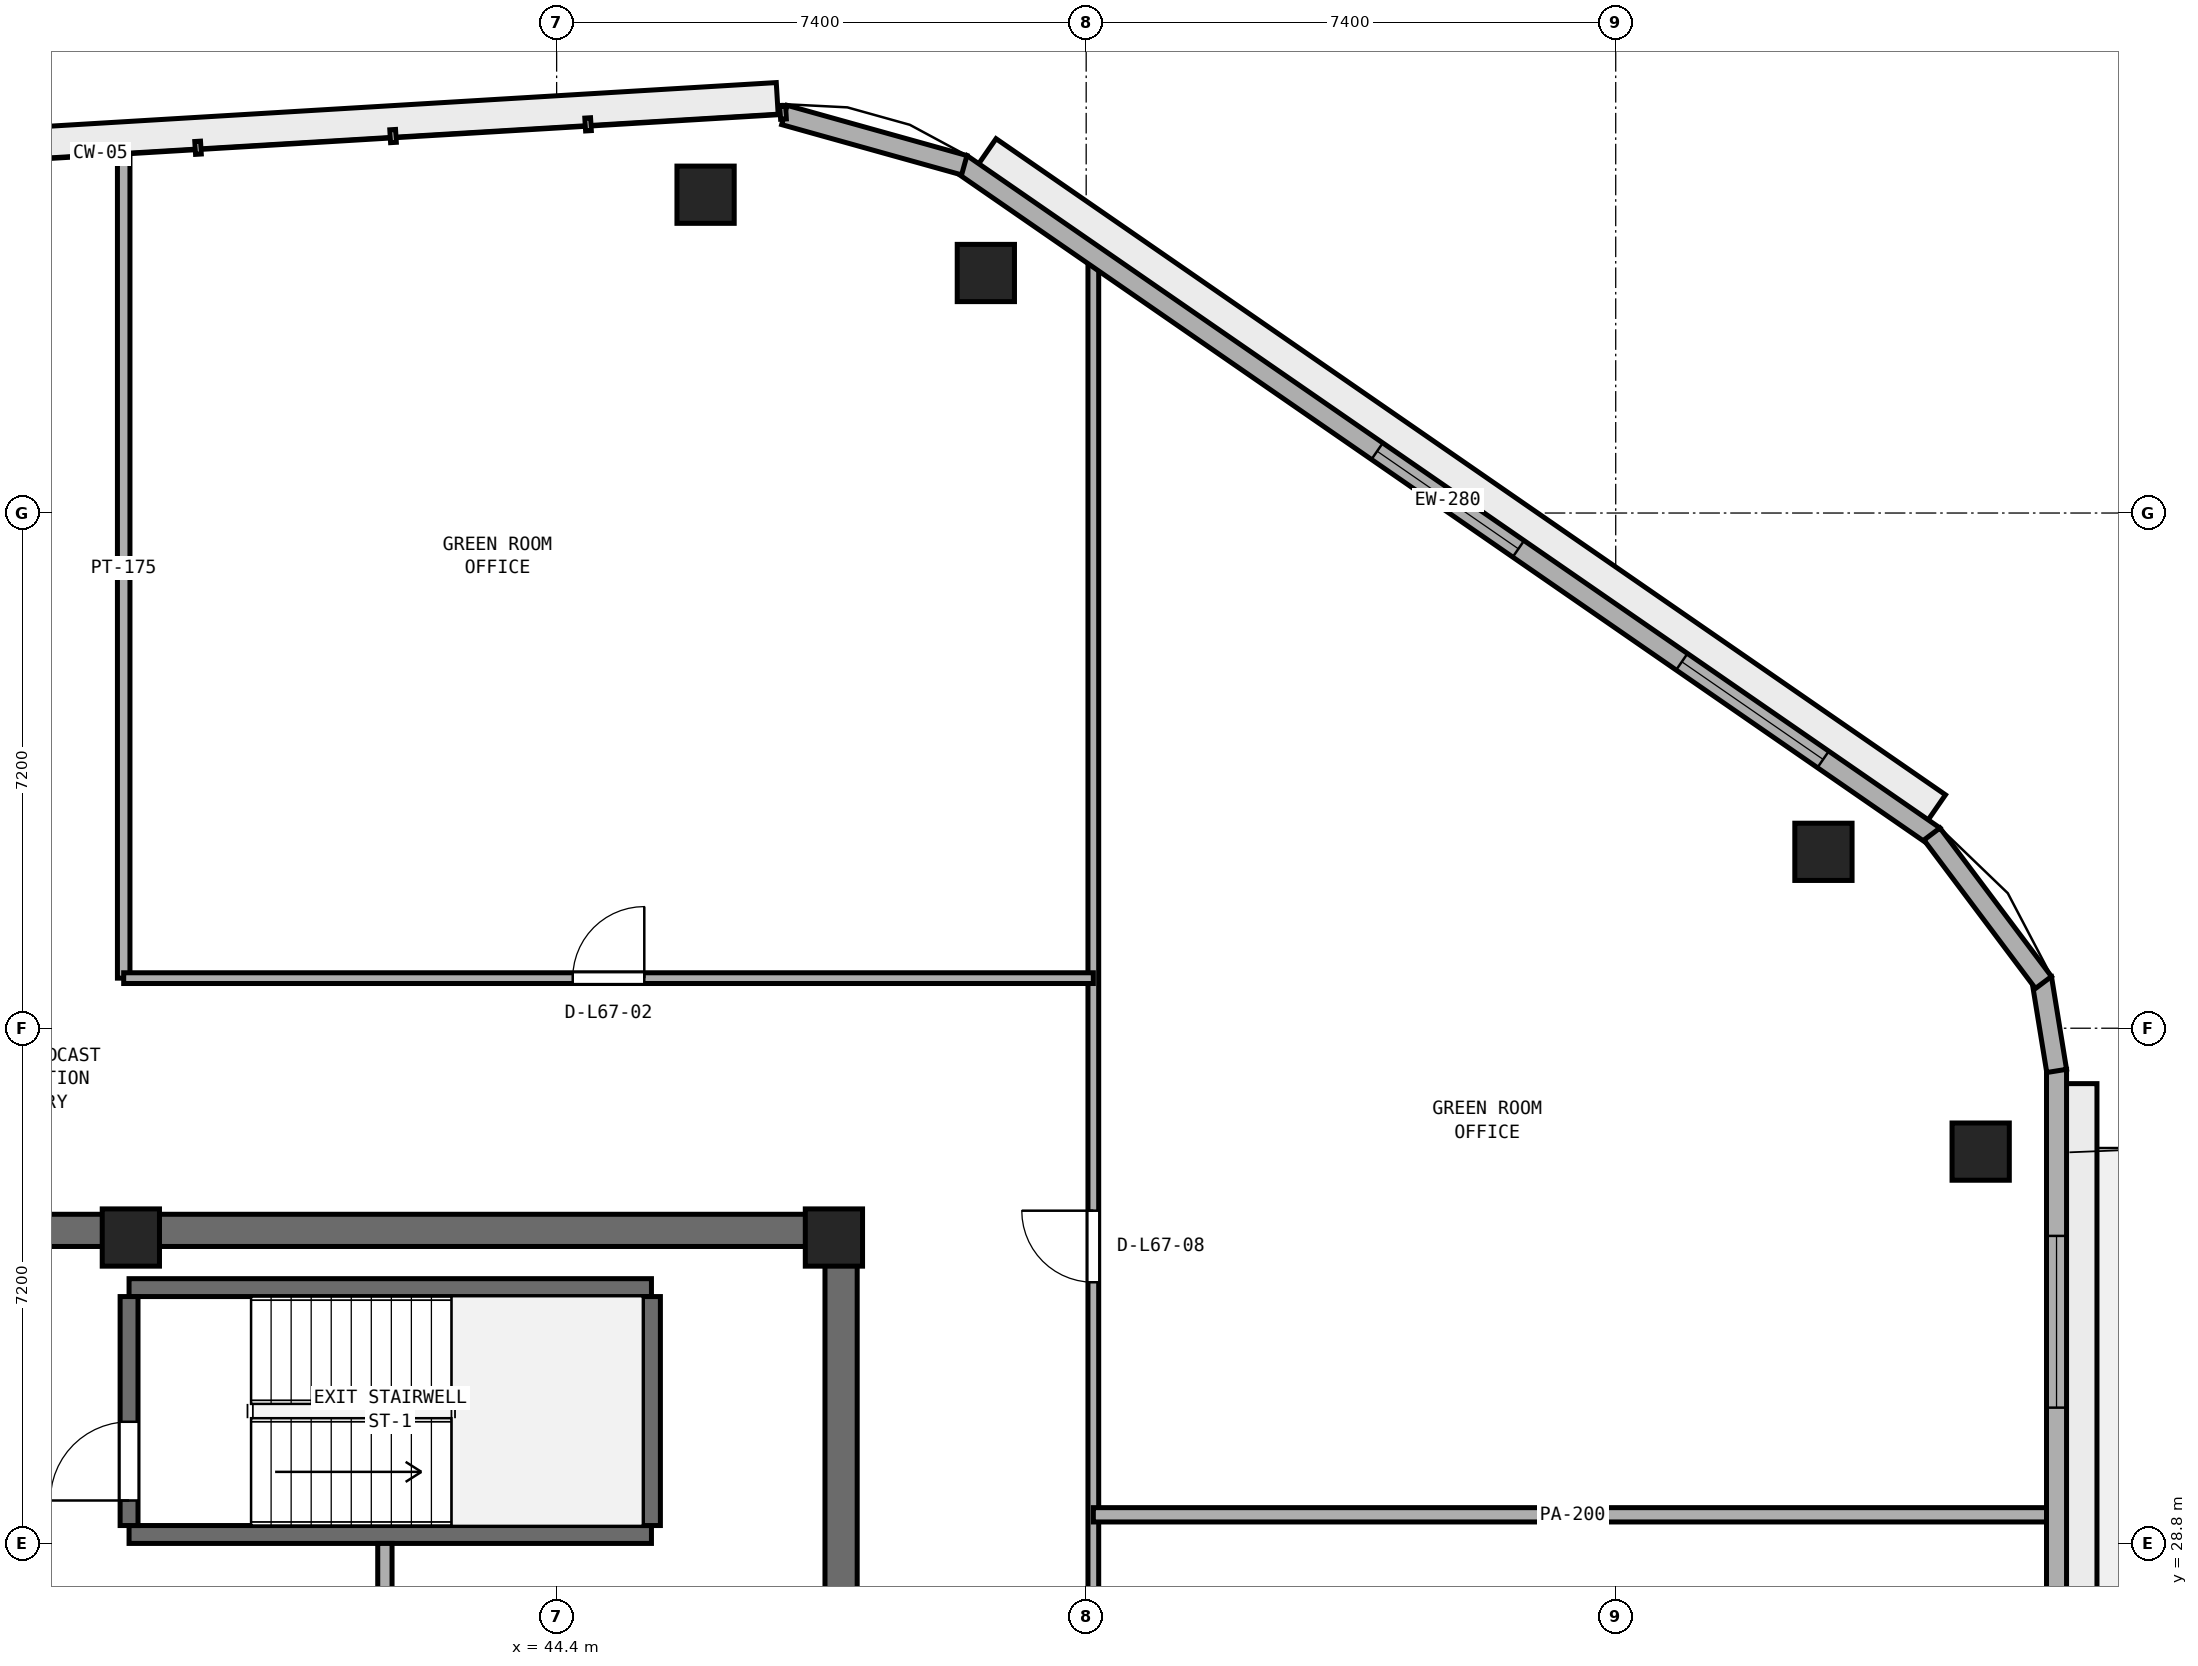
"""IFC4 building model, lengths in metres.
Left out: names, types, materials, properties, quantities, classifications, styles, units other than length and angle.
Written with IfcOpenShell. Run it as: python <this file> out.ifc"""

import sys

from ifc_helpers import new_model, si_unit, direction, frame, frame_2d, origin, origin_2d, place, context, subcontext, project, spatial, rectangle, extrude, element, fill, save


model = new_model("IFC4")
c1 = context("Model", 3, precision=1e-05, world=origin(), true_north=direction((0.0, 1.0)))
c2 = subcontext(c1, "Body", "Model", "MODEL_VIEW")
j1 = project(units=[si_unit("LENGTHUNIT", "METRE"), si_unit("PLANEANGLEUNIT", "RADIAN")], contexts=[c1])
p1 = place(None, origin())
s1 = spatial("IfcSite", under=j1, at=p1, CompositionType="ELEMENT")
p2 = place(p1, origin())
s2 = spatial("IfcBuilding", under=s1, at=p2, CompositionType="ELEMENT")
p3 = place(p2, frame((0.0, 0.0, 263.0)))
s3 = spatial("IfcBuildingStorey", under=s2, at=p3, CompositionType="ELEMENT", Elevation=263.0)
p4 = place(p3, frame((25.4, 33.175, 0.0), z_axis=(0.0, 0.0, 1.0), x_axis=(1.0, 0.0, 0.0)))
e1 = element("IfcWall", 1, at=p4, inside=s3, PredefinedType="SHEAR", context=c2, shape_type="SweptSolid", body=[
    extrude(rectangle(XDim=23.2, YDim=0.45, at=frame_2d((11.6, 0.0))), origin(), (0.0, 0.0, 1.0), 3.51),
])
p5 = place(p3, frame((48.375, 17.45, 0.0), z_axis=(0.0, 0.0, 1.0), x_axis=(0.0, 1.0, 0.0)))
e2 = element("IfcWall", 2, at=p5, inside=s3, PredefinedType="SHEAR", context=c2, shape_type="SweptSolid", body=[
    extrude(rectangle(XDim=15.5, YDim=0.45, at=frame_2d((7.75, 0.0))), origin(), (0.0, 0.0, 1.0), 3.51),
])
p6 = place(p5, frame((5.85, 0.0, 0.0)))
e3 = element("IfcOpeningElement", 3, at=p6, cuts=e2, PredefinedType="OPENING", context=c2, shape_type="SweptSolid", body=[
    extrude(rectangle(XDim=1.5, YDim=2.15, at=frame_2d((0.75, 1.075))), frame((0.0, 0.235, 0.0), z_axis=(0.0, -1.0, 0.0), x_axis=(1.0, 0.0, 0.0)), (0.0, 0.0, 1.0), 0.47),
])
for number, where, z_axis, x_axis in (
    (4, (48.275, 33.075, 0.0), (0.0, 0.0, 1.0), (1.0, 0.0, 0.0)),
    (5, (38.45, 33.075, 0.0), (0.0, 0.0, 1.0), (1.0, 0.0, 0.0)),
):
    element("IfcColumn", number, at=place(p3, frame(where, z_axis=z_axis, x_axis=x_axis)), inside=s3, PredefinedType="PILASTER", context=c2, shape_type="SweptSolid", body=[
        extrude(rectangle(XDim=0.8, YDim=0.8, at=origin_2d()), origin(), (0.0, 0.0, 1.0), 3.8),
    ])
for number, where, z_axis, x_axis in (
    (6, (64.3, 34.276, 0.0), (0.0, 0.0, 1.0), (1.0, 0.0, 0.0)),
    (7, (62.103, 38.465, 0.0), (0.0, 0.0, 1.0), (1.0, 0.0, 0.0)),
    (8, (50.398, 46.554, 0.0), (0.0, 0.0, 1.0), (1.0, 0.0, 0.0)),
    (9, (46.481, 47.648, 0.0), (0.0, 0.0, 1.0), (1.0, 0.0, 0.0)),
):
    element("IfcColumn", number, at=place(p3, frame(where, z_axis=z_axis, x_axis=x_axis)), inside=s3, PredefinedType="COLUMN", context=c2, shape_type="SweptSolid", body=[
        extrude(rectangle(XDim=0.8, YDim=0.8, at=origin_2d()), origin(), (0.0, 0.0, 1.0), 3.8),
    ])
for number, where, z_axis, x_axis in (
    (10, (38.425, 28.925, 0.0), (0.0, 0.0, 1.0), (1.0, 0.0, 0.0)),
    (11, (38.425, 32.375, 0.0), (0.0, 0.0, 1.0), (1.0, 0.0, 0.0)),
):
    element("IfcWall", number, at=place(p3, frame(where, z_axis=z_axis, x_axis=x_axis)), inside=s3, PredefinedType="SHEAR", context=c2, shape_type="SweptSolid", body=[
        extrude(rectangle(XDim=7.3, YDim=0.25, at=frame_2d((3.65, 0.0))), origin(), (0.0, 0.0, 1.0), 3.51),
    ])
p7 = place(p3, frame((38.425, 29.05, 0.0), z_axis=(0.0, 0.0, 1.0), x_axis=(0.0, 1.0, 0.0)))
e12 = element("IfcWall", 12, at=p7, inside=s3, PredefinedType="SHEAR", context=c2, shape_type="SweptSolid", body=[
    extrude(rectangle(XDim=3.2, YDim=0.25, at=frame_2d((1.6, 0.0))), origin(), (0.0, 0.0, 1.0), 3.51),
])
p8 = place(p7, frame((0.35, 0.0, 0.0)))
e13 = element("IfcOpeningElement", 13, at=p8, cuts=e12, PredefinedType="OPENING", context=c2, shape_type="SweptSolid", body=[
    extrude(rectangle(XDim=1.1, YDim=2.15, at=frame_2d((0.55, 1.075))), frame((0.0, 0.135, 0.0), z_axis=(0.0, -1.0, 0.0), x_axis=(1.0, 0.0, 0.0)), (0.0, 0.0, 1.0), 0.27),
])
p9 = place(p3, frame((45.725, 29.05, 0.0), z_axis=(0.0, 0.0, 1.0), x_axis=(0.0, 1.0, 0.0)))
e14 = element("IfcWall", 14, at=p9, inside=s3, PredefinedType="SHEAR", context=c2, shape_type="SweptSolid", body=[
    extrude(rectangle(XDim=3.2, YDim=0.25, at=frame_2d((1.6, 0.0))), origin(), (0.0, 0.0, 1.0), 3.51),
])
p10 = place(p3, frame((42.0, 22.75, 0.0), z_axis=(0.0, 0.0, 1.0), x_axis=(0.0, 1.0, 0.0)))
e15 = element("IfcWall", 15, at=p10, inside=s3, PredefinedType="SOLIDWALL", context=c2, shape_type="SweptSolid", body=[
    extrude(rectangle(XDim=6.05, YDim=0.2, at=frame_2d((3.025, 0.0))), origin(), (0.0, 0.0, 1.0), 3.51),
])
p11 = place(p10, frame((0.65, 0.0, 0.0)))
e16 = element("IfcOpeningElement", 16, at=p11, cuts=e15, PredefinedType="OPENING", context=c2, shape_type="SweptSolid", body=[
    extrude(rectangle(XDim=1.2, YDim=2.15, at=frame_2d((0.6, 1.075))), frame((0.0, 0.11, 0.0), z_axis=(0.0, -1.0, 0.0), x_axis=(1.0, 0.0, 0.0)), (0.0, 0.0, 1.0), 0.22),
])
p12 = place(p3, frame((51.9, 22.6, 0.0), z_axis=(0.0, 0.0, 1.0), x_axis=(0.0, 1.0, 0.0)))
e17 = element("IfcWall", 17, at=p12, inside=s3, PredefinedType="PARTITIONING", context=c2, shape_type="SweptSolid", body=[
    extrude(rectangle(XDim=24.235, YDim=0.15, at=frame_2d((12.117, 0.0))), origin(), (0.0, 0.0, 1.0), 3.51),
])
p13 = place(p12, frame((2.92, 0.0, 0.0)))
e18 = element("IfcOpeningElement", 18, at=p13, cuts=e17, PredefinedType="OPENING", context=c2, shape_type="SweptSolid", body=[
    extrude(rectangle(XDim=1.0, YDim=2.12, at=frame_2d((0.5, 1.06))), frame((0.0, 0.085, 0.0), z_axis=(0.0, -1.0, 0.0), x_axis=(1.0, 0.0, 0.0)), (0.0, 0.0, 1.0), 0.17),
])
p14 = place(p12, frame((9.85, 0.0, 0.0)))
e19 = element("IfcOpeningElement", 19, at=p14, cuts=e17, PredefinedType="OPENING", context=c2, shape_type="SweptSolid", body=[
    extrude(rectangle(XDim=1.0, YDim=2.12, at=frame_2d((0.5, 1.06))), frame((0.0, 0.085, 0.0), z_axis=(0.0, -1.0, 0.0), x_axis=(1.0, 0.0, 0.0)), (0.0, 0.0, 1.0), 0.17),
])
p15 = place(p3, frame((38.35, 36.7, 0.0), z_axis=(0.0, 0.0, 1.0), x_axis=(0.0, 1.0, 0.0)))
e20 = element("IfcWall", 20, at=p15, inside=s3, PredefinedType="PARTITIONING", context=c2, shape_type="SweptSolid", body=[
    extrude(rectangle(XDim=11.458, YDim=0.175, at=frame_2d((5.729, 0.0))), origin(), (0.0, 0.0, 1.0), 3.51),
])
p16 = place(p3, frame((51.9, 29.2, 0.0), z_axis=(0.0, 0.0, 1.0), x_axis=(1.0, 0.0, 0.0)))
e21 = element("IfcWall", 21, at=p16, inside=s3, PredefinedType="PARTITIONING", context=c2, shape_type="SweptSolid", body=[
    extrude(rectangle(XDim=13.395, YDim=0.2, at=frame_2d((6.698, 0.0))), origin(), (0.0, 0.0, 1.0), 3.51),
])
p17 = place(p3, frame((38.35, 36.7, 0.0), z_axis=(0.0, 0.0, 1.0), x_axis=(1.0, 0.0, 0.0)))
e22 = element("IfcWall", 22, at=p17, inside=s3, PredefinedType="PARTITIONING", context=c2, shape_type="SweptSolid", body=[
    extrude(rectangle(XDim=13.55, YDim=0.15, at=frame_2d((6.775, 0.0))), origin(), (0.0, 0.0, 1.0), 3.51),
])
p18 = place(p17, frame((6.275, 0.0, 0.0)))
e23 = element("IfcOpeningElement", 23, at=p18, cuts=e22, PredefinedType="OPENING", context=c2, shape_type="SweptSolid", body=[
    extrude(rectangle(XDim=1.0, YDim=2.12, at=frame_2d((0.5, 1.06))), frame((0.0, 0.085, 0.0), z_axis=(0.0, -1.0, 0.0), x_axis=(1.0, 0.0, 0.0)), (0.0, 0.0, 1.0), 0.17),
])
p19 = place(p3, frame((65.36, 16.258, 0.0), z_axis=(0.0, 0.0, 1.0), x_axis=(0.0, 1.0, 0.0)))
e24 = element("IfcWall", 24, at=p19, inside=s3, PredefinedType="STANDARD", context=c2, shape_type="SweptSolid", body=[
    extrude(rectangle(XDim=19.168, YDim=0.28, at=frame_2d((9.584, 0.0))), origin(), (0.0, 0.0, 1.0), 3.51),
])
p20 = place(p19, frame((9.034, 0.0, 0.0)))
e25 = element("IfcOpeningElement", 25, at=p20, cuts=e24, PredefinedType="OPENING", context=c2, shape_type="SweptSolid", body=[
    extrude(rectangle(XDim=1.1, YDim=2.2, at=frame_2d((0.55, 1.1))), frame((0.0, 0.15, 0.0), z_axis=(0.0, -1.0, 0.0), x_axis=(1.0, 0.0, 0.0)), (0.0, 0.0, 1.0), 0.3),
])
p21 = place(p19, frame((2.078, 0.0, 0.9)))
e26 = element("IfcOpeningElement", 26, at=p21, cuts=e24, PredefinedType="OPENING", context=c2, shape_type="SweptSolid", body=[
    extrude(rectangle(XDim=2.4, YDim=1.75, at=frame_2d((1.2, 0.875))), frame((0.0, 0.15, 0.0), z_axis=(0.0, -1.0, 0.0), x_axis=(1.0, 0.0, 0.0)), (0.0, 0.0, 1.0), 0.3),
])
p22 = place(p19, frame((14.44, 0.0, 0.9)))
e27 = element("IfcOpeningElement", 27, at=p22, cuts=e24, PredefinedType="OPENING", context=c2, shape_type="SweptSolid", body=[
    extrude(rectangle(XDim=2.4, YDim=1.75, at=frame_2d((1.2, 0.875))), frame((0.0, 0.15, 0.0), z_axis=(0.0, -1.0, 0.0), x_axis=(1.0, 0.0, 0.0)), (0.0, 0.0, 1.0), 0.3),
])
p23 = place(p3, frame((63.651, 38.683, 0.0), z_axis=(0.0, 0.0, 1.0), x_axis=(-0.822655095, 0.568540759022, 0.0)))
e28 = element("IfcWall", 28, at=p23, inside=s3, PredefinedType="STANDARD", context=c2, shape_type="SweptSolid", body=[
    extrude(rectangle(XDim=16.528, YDim=0.28, at=frame_2d((8.264, 0.0))), origin(), (0.0, 0.0, 1.0), 3.51),
])
p24 = place(p23, frame((1.888, 0.0, 0.9)))
e29 = element("IfcOpeningElement", 29, at=p24, cuts=e28, PredefinedType="OPENING", context=c2, shape_type="SweptSolid", body=[
    extrude(rectangle(XDim=2.4, YDim=1.75, at=frame_2d((1.2, 0.875))), frame((0.0, 0.15, 0.0), z_axis=(0.0, -1.0, 0.0), x_axis=(1.0, 0.0, 0.0)), (0.0, 0.0, 1.0), 0.3),
])
p25 = place(p23, frame((7.064, 0.0, 0.9)))
e30 = element("IfcOpeningElement", 30, at=p25, cuts=e28, PredefinedType="OPENING", context=c2, shape_type="SweptSolid", body=[
    extrude(rectangle(XDim=2.4, YDim=1.75, at=frame_2d((1.2, 0.875))), frame((0.0, 0.15, 0.0), z_axis=(0.0, -1.0, 0.0), x_axis=(1.0, 0.0, 0.0)), (0.0, 0.0, 1.0), 0.3),
])
p26 = place(p3, frame((65.362, 35.403, 0.0), z_axis=(0.0, 0.0, 1.0), x_axis=(-0.160271674114, 0.987072940809, 0.0)))
e31 = element("IfcWall", 31, at=p26, inside=s3, PredefinedType="STANDARD", context=c2, shape_type="SweptSolid", body=[
    extrude(rectangle(XDim=1.315, YDim=0.28, at=frame_2d((0.657, 0.0))), origin(), (0.0, 0.0, 1.0), 3.51),
])
p27 = place(p3, frame((65.177, 36.639, 0.0), z_axis=(0.0, 0.0, 1.0), x_axis=(-0.600436386467, 0.799672524104, 0.0)))
e32 = element("IfcWall", 32, at=p27, inside=s3, PredefinedType="STANDARD", context=c2, shape_type="SweptSolid", body=[
    extrude(rectangle(XDim=2.595, YDim=0.28, at=frame_2d((1.298, 0.0))), origin(), (0.0, 0.0, 1.0), 3.51),
])
p28 = place(p3, frame((50.096, 48.061, 0.0), z_axis=(0.0, 0.0, 1.0), x_axis=(-0.963120241504, 0.269071366751, 0.0)))
e33 = element("IfcWall", 33, at=p28, inside=s3, PredefinedType="STANDARD", context=c2, shape_type="SweptSolid", body=[
    extrude(rectangle(XDim=2.61, YDim=0.28, at=frame_2d((1.305, 0.0))), origin(), (0.0, 0.0, 1.0), 3.51),
])
p29 = place(p8, origin())
e34 = element("IfcDoor", 34, at=p29, inside=s3, OperationType="SINGLE_SWING_LEFT", PredefinedType="DOOR", context=c2, shape_type="SweptSolid", body=[
    extrude(rectangle(XDim=1.1, YDim=2.15, at=frame_2d((0.55, 1.075))), frame((0.0, 0.025, 0.0), z_axis=(0.0, -1.0, 0.0), x_axis=(1.0, 0.0, 0.0)), (0.0, 0.0, 1.0), 0.05),
])
fill(e13, e34)
p30 = place(p18, origin())
e35 = element("IfcDoor", 35, at=p30, inside=s3, OperationType="SINGLE_SWING_RIGHT", PredefinedType="DOOR", context=c2, shape_type="SweptSolid", body=[
    extrude(rectangle(XDim=1.0, YDim=2.12, at=frame_2d((0.5, 1.06))), frame((0.0, 0.025, 0.0), z_axis=(0.0, -1.0, 0.0), x_axis=(1.0, 0.0, 0.0)), (0.0, 0.0, 1.0), 0.05),
])
fill(e23, e35)
p31 = place(p14, origin())
e36 = element("IfcDoor", 36, at=p31, inside=s3, OperationType="SINGLE_SWING_RIGHT", PredefinedType="DOOR", context=c2, shape_type="SweptSolid", body=[
    extrude(rectangle(XDim=1.0, YDim=2.12, at=frame_2d((0.5, 1.06))), frame((0.0, 0.025, 0.0), z_axis=(0.0, -1.0, 0.0), x_axis=(1.0, 0.0, 0.0)), (0.0, 0.0, 1.0), 0.05),
])
fill(e19, e36)
p32 = place(p22, origin())
e37 = element("IfcWindow", 37, at=p32, inside=s3, PartitioningType="SINGLE_PANEL", PredefinedType="WINDOW", context=c2, shape_type="SweptSolid", body=[
    extrude(rectangle(XDim=2.4, YDim=1.75, at=frame_2d((1.2, 0.875))), frame((0.0, 0.03, 0.0), z_axis=(0.0, -1.0, 0.0), x_axis=(1.0, 0.0, 0.0)), (0.0, 0.0, 1.0), 0.06),
])
fill(e27, e37)
p33 = place(p24, origin())
e38 = element("IfcWindow", 38, at=p33, inside=s3, PartitioningType="SINGLE_PANEL", PredefinedType="WINDOW", context=c2, shape_type="SweptSolid", body=[
    extrude(rectangle(XDim=2.4, YDim=1.75, at=frame_2d((1.2, 0.875))), frame((0.0, 0.03, 0.0), z_axis=(0.0, -1.0, 0.0), x_axis=(1.0, 0.0, 0.0)), (0.0, 0.0, 1.0), 0.06),
])
fill(e29, e38)
p34 = place(p25, origin())
e39 = element("IfcWindow", 39, at=p34, inside=s3, PartitioningType="SINGLE_PANEL", PredefinedType="WINDOW", context=c2, shape_type="SweptSolid", body=[
    extrude(rectangle(XDim=2.4, YDim=1.75, at=frame_2d((1.2, 0.875))), frame((0.0, 0.03, 0.0), z_axis=(0.0, -1.0, 0.0), x_axis=(1.0, 0.0, 0.0)), (0.0, 0.0, 1.0), 0.06),
])
fill(e30, e39)
save(model, sys.argv[1])
